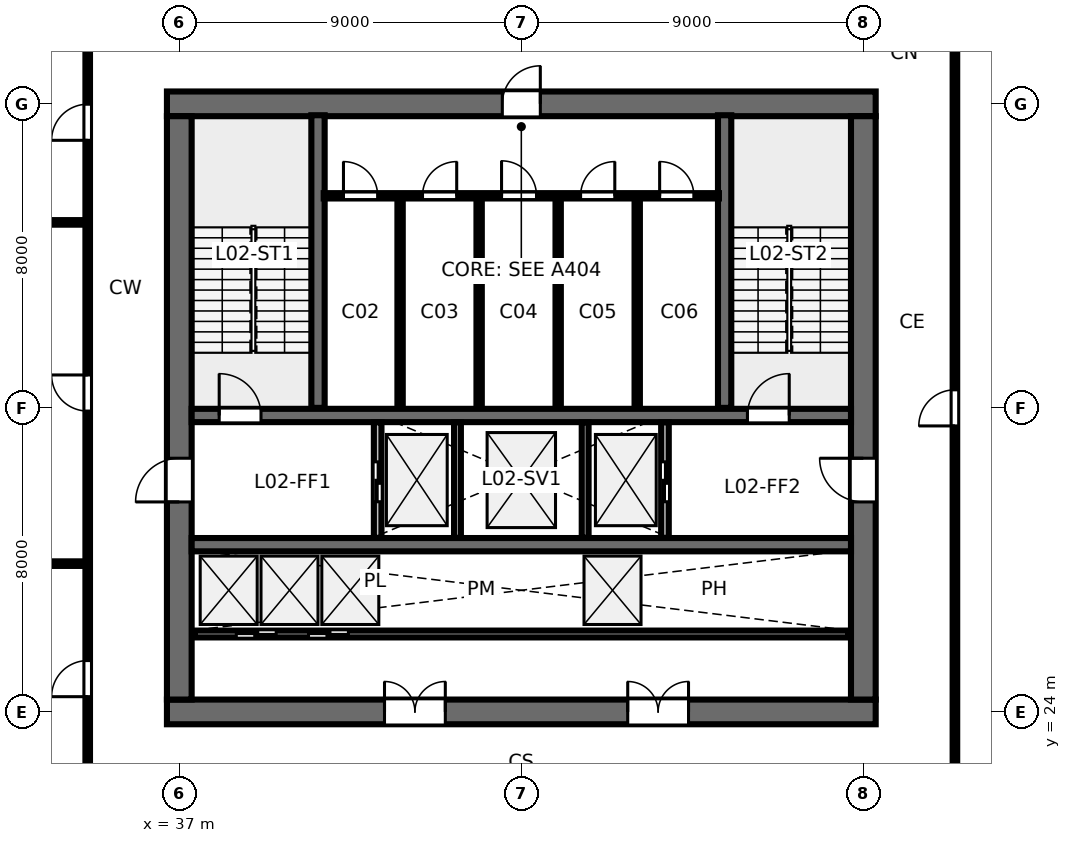
"""IFC4 building model, lengths in metres.
Left out: names, types, materials, properties, quantities, classifications, styles, units other than length and angle.
Written with IfcOpenShell. Run it as: python <this file> out.ifc"""

import sys

from ifc_helpers import new_model, si_unit, direction, frame, frame_2d, origin, place, context, subcontext, project, spatial, rectangle, extrude, element, fill, save


model = new_model("IFC4")
c1 = context("Model", 3, precision=1e-05, world=origin(), true_north=direction((0.0, 1.0)))
c2 = subcontext(c1, "Body", "Model", "MODEL_VIEW")
j1 = project(units=[si_unit("LENGTHUNIT", "METRE"), si_unit("PLANEANGLEUNIT", "RADIAN")], contexts=[c1])
p1 = place(None, origin())
s1 = spatial("IfcSite", under=j1, at=p1, CompositionType="ELEMENT")
p2 = place(p1, origin())
s2 = spatial("IfcBuilding", under=s1, at=p2, CompositionType="ELEMENT")
p3 = place(p2, frame((0.0, 0.0, 9.5)))
s3 = spatial("IfcBuildingStorey", under=s2, at=p3, CompositionType="ELEMENT", Elevation=9.5)
p4 = place(p3, frame((36.675, 24.0, 0.0), z_axis=(0.0, 0.0, 1.0), x_axis=(1.0, 0.0, 0.0)))
e1 = element("IfcWall", 1, at=p4, inside=s3, PredefinedType="SHEAR", context=c2, shape_type="SweptSolid", body=[
    extrude(rectangle(XDim=18.65, YDim=0.65, at=frame_2d((9.325, 0.0))), origin(), (0.0, 0.0, 1.0), 4.22),
])
p5 = place(p4, frame((5.725, 0.0, 0.0)))
e2 = element("IfcOpeningElement", 2, at=p5, cuts=e1, PredefinedType="OPENING", context=c2, shape_type="SweptSolid", body=[
    extrude(rectangle(XDim=1.6, YDim=2.15, at=frame_2d((0.8, 1.075))), frame((0.0, 0.335, 0.0), z_axis=(0.0, -1.0, 0.0), x_axis=(1.0, 0.0, 0.0)), (0.0, 0.0, 1.0), 0.67),
])
p6 = place(p4, frame((12.125, 0.0, 0.0)))
e3 = element("IfcOpeningElement", 3, at=p6, cuts=e1, PredefinedType="OPENING", context=c2, shape_type="SweptSolid", body=[
    extrude(rectangle(XDim=1.6, YDim=2.15, at=frame_2d((0.8, 1.075))), frame((0.0, 0.335, 0.0), z_axis=(0.0, -1.0, 0.0), x_axis=(1.0, 0.0, 0.0)), (0.0, 0.0, 1.0), 0.67),
])
p7 = place(p3, frame((36.675, 40.0, 0.0), z_axis=(0.0, 0.0, 1.0), x_axis=(1.0, 0.0, 0.0)))
e4 = element("IfcWall", 4, at=p7, inside=s3, PredefinedType="SHEAR", context=c2, shape_type="SweptSolid", body=[
    extrude(rectangle(XDim=18.65, YDim=0.65, at=frame_2d((9.325, 0.0))), origin(), (0.0, 0.0, 1.0), 4.22),
])
p8 = place(p7, frame((8.825, 0.0, 0.0)))
e5 = element("IfcOpeningElement", 5, at=p8, cuts=e4, PredefinedType="OPENING", context=c2, shape_type="SweptSolid", body=[
    extrude(rectangle(XDim=1.0, YDim=2.15, at=frame_2d((0.5, 1.075))), frame((0.0, 0.335, 0.0), z_axis=(0.0, -1.0, 0.0), x_axis=(1.0, 0.0, 0.0)), (0.0, 0.0, 1.0), 0.67),
])
p9 = place(p3, frame((37.0, 24.325, 0.0), z_axis=(0.0, 0.0, 1.0), x_axis=(0.0, 1.0, 0.0)))
e6 = element("IfcWall", 6, at=p9, inside=s3, PredefinedType="SHEAR", context=c2, shape_type="SweptSolid", body=[
    extrude(rectangle(XDim=15.35, YDim=0.65, at=frame_2d((7.675, 0.0))), origin(), (0.0, 0.0, 1.0), 4.22),
])
p10 = place(p9, frame((5.2, 0.0, 0.0)))
e7 = element("IfcOpeningElement", 7, at=p10, cuts=e6, PredefinedType="OPENING", context=c2, shape_type="SweptSolid", body=[
    extrude(rectangle(XDim=1.15, YDim=2.15, at=frame_2d((0.575, 1.075))), frame((0.0, 0.335, 0.0), z_axis=(0.0, -1.0, 0.0), x_axis=(1.0, 0.0, 0.0)), (0.0, 0.0, 1.0), 0.67),
])
p11 = place(p3, frame((55.0, 24.325, 0.0), z_axis=(0.0, 0.0, 1.0), x_axis=(0.0, 1.0, 0.0)))
e8 = element("IfcWall", 8, at=p11, inside=s3, PredefinedType="SHEAR", context=c2, shape_type="SweptSolid", body=[
    extrude(rectangle(XDim=15.35, YDim=0.65, at=frame_2d((7.675, 0.0))), origin(), (0.0, 0.0, 1.0), 4.22),
])
p12 = place(p11, frame((5.2, 0.0, 0.0)))
e9 = element("IfcOpeningElement", 9, at=p12, cuts=e8, PredefinedType="OPENING", context=c2, shape_type="SweptSolid", body=[
    extrude(rectangle(XDim=1.15, YDim=2.15, at=frame_2d((0.575, 1.075))), frame((0.0, 0.335, 0.0), z_axis=(0.0, -1.0, 0.0), x_axis=(1.0, 0.0, 0.0)), (0.0, 0.0, 1.0), 0.67),
])
p13 = place(p3, frame((37.325, 31.8, 0.0), z_axis=(0.0, 0.0, 1.0), x_axis=(1.0, 0.0, 0.0)))
e10 = element("IfcWall", 10, at=p13, inside=s3, PredefinedType="SHEAR", context=c2, shape_type="SweptSolid", body=[
    extrude(rectangle(XDim=17.35, YDim=0.35, at=frame_2d((8.675, 0.0))), origin(), (0.0, 0.0, 1.0), 4.22),
])
p14 = place(p13, frame((0.725, 0.0, 0.0)))
e11 = element("IfcOpeningElement", 11, at=p14, cuts=e10, PredefinedType="OPENING", context=c2, shape_type="SweptSolid", body=[
    extrude(rectangle(XDim=1.1, YDim=2.15, at=frame_2d((0.55, 1.075))), frame((0.0, 0.185, 0.0), z_axis=(0.0, -1.0, 0.0), x_axis=(1.0, 0.0, 0.0)), (0.0, 0.0, 1.0), 0.37),
])
p15 = place(p13, frame((14.625, 0.0, 0.0)))
e12 = element("IfcOpeningElement", 12, at=p15, cuts=e10, PredefinedType="OPENING", context=c2, shape_type="SweptSolid", body=[
    extrude(rectangle(XDim=1.1, YDim=2.15, at=frame_2d((0.55, 1.075))), frame((0.0, 0.185, 0.0), z_axis=(0.0, -1.0, 0.0), x_axis=(1.0, 0.0, 0.0)), (0.0, 0.0, 1.0), 0.37),
])
p16 = place(p3, frame((37.325, 28.4, 0.0), z_axis=(0.0, 0.0, 1.0), x_axis=(1.0, 0.0, 0.0)))
e13 = element("IfcWall", 13, at=p16, inside=s3, PredefinedType="SHEAR", context=c2, shape_type="SweptSolid", body=[
    extrude(rectangle(XDim=17.35, YDim=0.35, at=frame_2d((8.675, 0.0))), origin(), (0.0, 0.0, 1.0), 4.22),
])
for number, where, z_axis, x_axis in (
    (14, (40.65, 32.0, 0.0), (0.0, 0.0, 1.0), (0.0, 1.0, 0.0)),
    (15, (51.35, 32.0, 0.0), (0.0, 0.0, 1.0), (0.0, 1.0, 0.0)),
):
    element("IfcWall", number, at=place(p3, frame(where, z_axis=z_axis, x_axis=x_axis)), inside=s3, PredefinedType="SHEAR", context=c2, shape_type="SweptSolid", body=[
        extrude(rectangle(XDim=7.7, YDim=0.35, at=frame_2d((3.85, 0.0))), origin(), (0.0, 0.0, 1.0), 4.5),
    ])
for number, where, z_axis, x_axis in (
    (16, (42.81, 32.05, 0.0), (0.0, 0.0, 1.0), (0.0, 1.0, 0.0)),
    (17, (44.89, 32.05, 0.0), (0.0, 0.0, 1.0), (0.0, 1.0, 0.0)),
    (18, (46.97, 32.05, 0.0), (0.0, 0.0, 1.0), (0.0, 1.0, 0.0)),
    (19, (49.05, 32.05, 0.0), (0.0, 0.0, 1.0), (0.0, 1.0, 0.0)),
):
    element("IfcWall", number, at=place(p3, frame(where, z_axis=z_axis, x_axis=x_axis)), inside=s3, PredefinedType="PARTITIONING", context=c2, shape_type="SweptSolid", body=[
        extrude(rectangle(XDim=5.5, YDim=0.14, at=frame_2d((2.75, 0.0))), origin(), (0.0, 0.0, 1.0), 4.21),
    ])
p17 = place(p3, frame((40.8, 37.58, 0.0), z_axis=(0.0, 0.0, 1.0), x_axis=(1.0, 0.0, 0.0)))
e20 = element("IfcWall", 20, at=p17, inside=s3, PredefinedType="PARTITIONING", context=c2, shape_type="SweptSolid", body=[
    extrude(rectangle(XDim=10.4, YDim=0.14, at=frame_2d((5.2, 0.0))), origin(), (0.0, 0.0, 1.0), 4.21),
])
p18 = place(p17, frame((0.52, 0.0, 0.0)))
e21 = element("IfcOpeningElement", 21, at=p18, cuts=e20, PredefinedType="OPENING", context=c2, shape_type="SweptSolid", body=[
    extrude(rectangle(XDim=0.9, YDim=2.15, at=frame_2d((0.45, 1.075))), frame((0.0, 0.08, 0.0), z_axis=(0.0, -1.0, 0.0), x_axis=(1.0, 0.0, 0.0)), (0.0, 0.0, 1.0), 0.16),
])
p19 = place(p17, frame((2.6, 0.0, 0.0)))
e22 = element("IfcOpeningElement", 22, at=p19, cuts=e20, PredefinedType="OPENING", context=c2, shape_type="SweptSolid", body=[
    extrude(rectangle(XDim=0.9, YDim=2.15, at=frame_2d((0.45, 1.075))), frame((0.0, 0.08, 0.0), z_axis=(0.0, -1.0, 0.0), x_axis=(1.0, 0.0, 0.0)), (0.0, 0.0, 1.0), 0.16),
])
p20 = place(p17, frame((4.68, 0.0, 0.0)))
e23 = element("IfcOpeningElement", 23, at=p20, cuts=e20, PredefinedType="OPENING", context=c2, shape_type="SweptSolid", body=[
    extrude(rectangle(XDim=0.92, YDim=2.15, at=frame_2d((0.46, 1.075))), frame((0.0, 0.08, 0.0), z_axis=(0.0, -1.0, 0.0), x_axis=(1.0, 0.0, 0.0)), (0.0, 0.0, 1.0), 0.16),
])
p21 = place(p17, frame((6.76, 0.0, 0.0)))
e24 = element("IfcOpeningElement", 24, at=p21, cuts=e20, PredefinedType="OPENING", context=c2, shape_type="SweptSolid", body=[
    extrude(rectangle(XDim=0.9, YDim=2.15, at=frame_2d((0.45, 1.075))), frame((0.0, 0.08, 0.0), z_axis=(0.0, -1.0, 0.0), x_axis=(1.0, 0.0, 0.0)), (0.0, 0.0, 1.0), 0.16),
])
p22 = place(p17, frame((8.84, 0.0, 0.0)))
e25 = element("IfcOpeningElement", 25, at=p22, cuts=e20, PredefinedType="OPENING", context=c2, shape_type="SweptSolid", body=[
    extrude(rectangle(XDim=0.9, YDim=2.15, at=frame_2d((0.45, 1.075))), frame((0.0, 0.08, 0.0), z_axis=(0.0, -1.0, 0.0), x_axis=(1.0, 0.0, 0.0)), (0.0, 0.0, 1.0), 0.16),
])
p23 = place(p3, frame((42.22, 28.58, 0.0), z_axis=(0.0, 0.0, 1.0), x_axis=(0.0, 1.0, 0.0)))
e26 = element("IfcWall", 26, at=p23, inside=s3, PredefinedType="PARTITIONING", context=c2, shape_type="SweptSolid", body=[
    extrude(rectangle(XDim=3.04, YDim=0.2, at=frame_2d((1.52, 0.0))), origin(), (0.0, 0.0, 1.0), 4.21),
])
p24 = place(p23, frame((0.95, 0.0, 0.0)))
e27 = element("IfcOpeningElement", 27, at=p24, cuts=e26, PredefinedType="OPENING", context=c2, shape_type="SweptSolid", body=[
    extrude(rectangle(XDim=1.05, YDim=2.15, at=frame_2d((0.525, 1.075))), frame((0.0, 0.11, 0.0), z_axis=(0.0, -1.0, 0.0), x_axis=(1.0, 0.0, 0.0)), (0.0, 0.0, 1.0), 0.22),
])
p25 = place(p3, frame((49.78, 28.58, 0.0), z_axis=(0.0, 0.0, 1.0), x_axis=(0.0, 1.0, 0.0)))
e28 = element("IfcWall", 28, at=p25, inside=s3, PredefinedType="PARTITIONING", context=c2, shape_type="SweptSolid", body=[
    extrude(rectangle(XDim=3.04, YDim=0.2, at=frame_2d((1.52, 0.0))), origin(), (0.0, 0.0, 1.0), 4.21),
])
p26 = place(p25, frame((0.95, 0.0, 0.0)))
e29 = element("IfcOpeningElement", 29, at=p26, cuts=e28, PredefinedType="OPENING", context=c2, shape_type="SweptSolid", body=[
    extrude(rectangle(XDim=1.05, YDim=2.15, at=frame_2d((0.525, 1.075))), frame((0.0, 0.11, 0.0), z_axis=(0.0, -1.0, 0.0), x_axis=(1.0, 0.0, 0.0)), (0.0, 0.0, 1.0), 0.22),
])
for number, where, z_axis, x_axis in (
    (30, (44.32, 28.58, 0.0), (0.0, 0.0, 1.0), (0.0, 1.0, 0.0)),
    (31, (47.68, 28.58, 0.0), (0.0, 0.0, 1.0), (0.0, 1.0, 0.0)),
):
    element("IfcWall", number, at=place(p3, frame(where, z_axis=z_axis, x_axis=x_axis)), inside=s3, PredefinedType="PARTITIONING", context=c2, shape_type="SweptSolid", body=[
        extrude(rectangle(XDim=3.04, YDim=0.18, at=frame_2d((1.52, 0.0))), origin(), (0.0, 0.0, 1.0), 4.21),
    ])
p27 = place(p3, frame((37.4, 26.05, 0.0), z_axis=(0.0, 0.0, 1.0), x_axis=(1.0, 0.0, 0.0)))
e32 = element("IfcWall", 32, at=p27, inside=s3, PredefinedType="PARTITIONING", context=c2, shape_type="SweptSolid", body=[
    extrude(rectangle(XDim=17.2, YDim=0.18, at=frame_2d((8.6, 0.0))), origin(), (0.0, 0.0, 1.0), 4.21),
])
p28 = place(p27, frame((1.1, 0.0, 0.0)))
e33 = element("IfcOpeningElement", 33, at=p28, cuts=e32, PredefinedType="OPENING", context=c2, shape_type="SweptSolid", body=[
    extrude(rectangle(XDim=1.05, YDim=2.15, at=frame_2d((0.525, 1.075))), frame((0.0, 0.1, 0.0), z_axis=(0.0, -1.0, 0.0), x_axis=(1.0, 0.0, 0.0)), (0.0, 0.0, 1.0), 0.2),
])
p29 = place(p27, frame((3.0, 0.0, 0.0)))
e34 = element("IfcOpeningElement", 34, at=p29, cuts=e32, PredefinedType="OPENING", context=c2, shape_type="SweptSolid", body=[
    extrude(rectangle(XDim=1.05, YDim=2.15, at=frame_2d((0.525, 1.075))), frame((0.0, 0.1, 0.0), z_axis=(0.0, -1.0, 0.0), x_axis=(1.0, 0.0, 0.0)), (0.0, 0.0, 1.0), 0.2),
])
p30 = place(p3, frame((34.59, 27.902, 0.0), z_axis=(0.0, 0.0, 1.0), x_axis=(-1.0, 0.0, 0.0)))
e35 = element("IfcWall", 35, at=p30, inside=s3, PredefinedType="PARTITIONING", context=c2, shape_type="SweptSolid", body=[
    extrude(rectangle(XDim=6.24, YDim=0.12, at=frame_2d((3.12, 0.0))), origin(), (0.0, 0.0, 1.0), 3.31),
])
p31 = place(p30, frame((1.4, 0.0, 0.0)))
e36 = element("IfcOpeningElement", 36, at=p31, cuts=e35, PredefinedType="OPENING", context=c2, shape_type="SweptSolid", body=[
    extrude(rectangle(XDim=0.9, YDim=2.15, at=frame_2d((0.45, 1.075))), frame((0.0, 0.07, 0.0), z_axis=(0.0, -1.0, 0.0), x_axis=(1.0, 0.0, 0.0)), (0.0, 0.0, 1.0), 0.14),
])
p32 = place(p3, frame((34.59, 36.88, 0.0), z_axis=(0.0, 0.0, 1.0), x_axis=(-1.0, 0.0, 0.0)))
e37 = element("IfcWall", 37, at=p32, inside=s3, PredefinedType="PARTITIONING", context=c2, shape_type="SweptSolid", body=[
    extrude(rectangle(XDim=25.41, YDim=0.12, at=frame_2d((12.705, 0.0))), origin(), (0.0, 0.0, 1.0), 3.31),
])
p33 = place(p32, frame((1.4, 0.0, 0.0)))
e38 = element("IfcOpeningElement", 38, at=p33, cuts=e37, PredefinedType="OPENING", context=c2, shape_type="SweptSolid", body=[
    extrude(rectangle(XDim=0.9, YDim=2.15, at=frame_2d((0.45, 1.075))), frame((0.0, 0.07, 0.0), z_axis=(0.0, -1.0, 0.0), x_axis=(1.0, 0.0, 0.0)), (0.0, 0.0, 1.0), 0.14),
])
p34 = place(p3, frame((34.59, 21.65, 0.0), z_axis=(0.0, 0.0, 1.0), x_axis=(0.0, 1.0, 0.0)))
e39 = element("IfcWall", 39, at=p34, inside=s3, PredefinedType="PARTITIONING", context=c2, shape_type="SweptSolid", body=[
    extrude(rectangle(XDim=20.7, YDim=0.12, at=frame_2d((10.35, 0.0))), origin(), (0.0, 0.0, 1.0), 3.31),
])
p35 = place(p34, frame((2.751, 0.0, 0.0)))
e40 = element("IfcOpeningElement", 40, at=p35, cuts=e39, PredefinedType="OPENING", context=c2, shape_type="SweptSolid", body=[
    extrude(rectangle(XDim=0.95, YDim=2.15, at=frame_2d((0.475, 1.075))), frame((0.0, 0.07, 0.0), z_axis=(0.0, -1.0, 0.0), x_axis=(1.0, 0.0, 0.0)), (0.0, 0.0, 1.0), 0.14),
])
p36 = place(p34, frame((10.266, 0.0, 0.0)))
e41 = element("IfcOpeningElement", 41, at=p36, cuts=e39, PredefinedType="OPENING", context=c2, shape_type="SweptSolid", body=[
    extrude(rectangle(XDim=0.95, YDim=2.15, at=frame_2d((0.475, 1.075))), frame((0.0, 0.07, 0.0), z_axis=(0.0, -1.0, 0.0), x_axis=(1.0, 0.0, 0.0)), (0.0, 0.0, 1.0), 0.14),
])
p37 = place(p34, frame((17.39, 0.0, 0.0)))
e42 = element("IfcOpeningElement", 42, at=p37, cuts=e39, PredefinedType="OPENING", context=c2, shape_type="SweptSolid", body=[
    extrude(rectangle(XDim=0.95, YDim=2.15, at=frame_2d((0.475, 1.075))), frame((0.0, 0.07, 0.0), z_axis=(0.0, -1.0, 0.0), x_axis=(1.0, 0.0, 0.0)), (0.0, 0.0, 1.0), 0.14),
])
p38 = place(p3, frame((57.41, 21.65, 0.0), z_axis=(0.0, 0.0, 1.0), x_axis=(0.0, 1.0, 0.0)))
e43 = element("IfcWall", 43, at=p38, inside=s3, PredefinedType="PARTITIONING", context=c2, shape_type="SweptSolid", body=[
    extrude(rectangle(XDim=20.7, YDim=0.12, at=frame_2d((10.35, 0.0))), origin(), (0.0, 0.0, 1.0), 3.31),
])
p39 = place(p38, frame((9.875, 0.0, 0.0)))
e44 = element("IfcOpeningElement", 44, at=p39, cuts=e43, PredefinedType="OPENING", context=c2, shape_type="SweptSolid", body=[
    extrude(rectangle(XDim=0.95, YDim=2.15, at=frame_2d((0.475, 1.075))), frame((0.0, 0.07, 0.0), z_axis=(0.0, -1.0, 0.0), x_axis=(1.0, 0.0, 0.0)), (0.0, 0.0, 1.0), 0.14),
])
p40 = place(p14, origin())
e45 = element("IfcDoor", 45, at=p40, inside=s3, OperationType="SINGLE_SWING_LEFT", PredefinedType="DOOR", context=c2, shape_type="SweptSolid", body=[
    extrude(rectangle(XDim=1.1, YDim=2.15, at=frame_2d((0.55, 1.075))), frame((0.0, 0.025, 0.0), z_axis=(0.0, -1.0, 0.0), x_axis=(1.0, 0.0, 0.0)), (0.0, 0.0, 1.0), 0.05),
])
fill(e11, e45)
p41 = place(p15, origin())
e46 = element("IfcDoor", 46, at=p41, inside=s3, OperationType="SINGLE_SWING_RIGHT", PredefinedType="DOOR", context=c2, shape_type="SweptSolid", body=[
    extrude(rectangle(XDim=1.1, YDim=2.15, at=frame_2d((0.55, 1.075))), frame((0.0, 0.025, 0.0), z_axis=(0.0, -1.0, 0.0), x_axis=(1.0, 0.0, 0.0)), (0.0, 0.0, 1.0), 0.05),
])
fill(e12, e46)
p42 = place(p8, origin())
e47 = element("IfcDoor", 47, at=p42, inside=s3, OperationType="SINGLE_SWING_RIGHT", PredefinedType="DOOR", context=c2, shape_type="SweptSolid", body=[
    extrude(rectangle(XDim=1.0, YDim=2.15, at=frame_2d((0.5, 1.075))), frame((0.0, 0.025, 0.0), z_axis=(0.0, -1.0, 0.0), x_axis=(1.0, 0.0, 0.0)), (0.0, 0.0, 1.0), 0.05),
])
fill(e5, e47)
p43 = place(p10, origin())
e48 = element("IfcDoor", 48, at=p43, inside=s3, OperationType="SINGLE_SWING_LEFT", PredefinedType="DOOR", context=c2, shape_type="SweptSolid", body=[
    extrude(rectangle(XDim=1.15, YDim=2.15, at=frame_2d((0.575, 1.075))), frame((0.0, 0.025, 0.0), z_axis=(0.0, -1.0, 0.0), x_axis=(1.0, 0.0, 0.0)), (0.0, 0.0, 1.0), 0.05),
])
fill(e7, e48)
p44 = place(p12, origin())
e49 = element("IfcDoor", 49, at=p44, inside=s3, OperationType="SINGLE_SWING_RIGHT", PredefinedType="DOOR", context=c2, shape_type="SweptSolid", body=[
    extrude(rectangle(XDim=1.15, YDim=2.15, at=frame_2d((0.575, 1.075))), frame((0.0, 0.025, 0.0), z_axis=(0.0, -1.0, 0.0), x_axis=(1.0, 0.0, 0.0)), (0.0, 0.0, 1.0), 0.05),
])
fill(e9, e49)
p45 = place(p5, origin())
e50 = element("IfcDoor", 50, at=p45, inside=s3, OperationType="DOUBLE_DOOR_SINGLE_SWING", PredefinedType="DOOR", context=c2, shape_type="SweptSolid", body=[
    extrude(rectangle(XDim=1.6, YDim=2.15, at=frame_2d((0.8, 1.075))), frame((0.0, 0.025, 0.0), z_axis=(0.0, -1.0, 0.0), x_axis=(1.0, 0.0, 0.0)), (0.0, 0.0, 1.0), 0.05),
])
fill(e2, e50)
p46 = place(p6, origin())
e51 = element("IfcDoor", 51, at=p46, inside=s3, OperationType="DOUBLE_DOOR_SINGLE_SWING", PredefinedType="DOOR", context=c2, shape_type="SweptSolid", body=[
    extrude(rectangle(XDim=1.6, YDim=2.15, at=frame_2d((0.8, 1.075))), frame((0.0, 0.025, 0.0), z_axis=(0.0, -1.0, 0.0), x_axis=(1.0, 0.0, 0.0)), (0.0, 0.0, 1.0), 0.05),
])
fill(e3, e51)
p47 = place(p18, origin())
e52 = element("IfcDoor", 52, at=p47, inside=s3, OperationType="SINGLE_SWING_LEFT", PredefinedType="DOOR", context=c2, shape_type="SweptSolid", body=[
    extrude(rectangle(XDim=0.9, YDim=2.15, at=frame_2d((0.45, 1.075))), frame((0.0, 0.025, 0.0), z_axis=(0.0, -1.0, 0.0), x_axis=(1.0, 0.0, 0.0)), (0.0, 0.0, 1.0), 0.05),
])
fill(e21, e52)
p48 = place(p19, origin())
e53 = element("IfcDoor", 53, at=p48, inside=s3, OperationType="SINGLE_SWING_RIGHT", PredefinedType="DOOR", context=c2, shape_type="SweptSolid", body=[
    extrude(rectangle(XDim=0.9, YDim=2.15, at=frame_2d((0.45, 1.075))), frame((0.0, 0.025, 0.0), z_axis=(0.0, -1.0, 0.0), x_axis=(1.0, 0.0, 0.0)), (0.0, 0.0, 1.0), 0.05),
])
fill(e22, e53)
p49 = place(p20, origin())
e54 = element("IfcDoor", 54, at=p49, inside=s3, OperationType="SINGLE_SWING_LEFT", PredefinedType="DOOR", context=c2, shape_type="SweptSolid", body=[
    extrude(rectangle(XDim=0.92, YDim=2.15, at=frame_2d((0.46, 1.075))), frame((0.0, 0.025, 0.0), z_axis=(0.0, -1.0, 0.0), x_axis=(1.0, 0.0, 0.0)), (0.0, 0.0, 1.0), 0.05),
])
fill(e23, e54)
p50 = place(p21, origin())
e55 = element("IfcDoor", 55, at=p50, inside=s3, OperationType="SINGLE_SWING_RIGHT", PredefinedType="DOOR", context=c2, shape_type="SweptSolid", body=[
    extrude(rectangle(XDim=0.9, YDim=2.15, at=frame_2d((0.45, 1.075))), frame((0.0, 0.025, 0.0), z_axis=(0.0, -1.0, 0.0), x_axis=(1.0, 0.0, 0.0)), (0.0, 0.0, 1.0), 0.05),
])
fill(e24, e55)
p51 = place(p22, origin())
e56 = element("IfcDoor", 56, at=p51, inside=s3, OperationType="SINGLE_SWING_LEFT", PredefinedType="DOOR", context=c2, shape_type="SweptSolid", body=[
    extrude(rectangle(XDim=0.9, YDim=2.15, at=frame_2d((0.45, 1.075))), frame((0.0, 0.025, 0.0), z_axis=(0.0, -1.0, 0.0), x_axis=(1.0, 0.0, 0.0)), (0.0, 0.0, 1.0), 0.05),
])
fill(e25, e56)
p52 = place(p24, origin())
e57 = element("IfcDoor", 57, at=p52, inside=s3, OperationType="SLIDING_TO_LEFT", PredefinedType="DOOR", context=c2, shape_type="SweptSolid", body=[
    extrude(rectangle(XDim=1.05, YDim=2.15, at=frame_2d((0.525, 1.075))), frame((0.0, 0.025, 0.0), z_axis=(0.0, -1.0, 0.0), x_axis=(1.0, 0.0, 0.0)), (0.0, 0.0, 1.0), 0.05),
])
fill(e27, e57)
p53 = place(p26, origin())
e58 = element("IfcDoor", 58, at=p53, inside=s3, OperationType="SLIDING_TO_RIGHT", PredefinedType="DOOR", context=c2, shape_type="SweptSolid", body=[
    extrude(rectangle(XDim=1.05, YDim=2.15, at=frame_2d((0.525, 1.075))), frame((0.0, 0.025, 0.0), z_axis=(0.0, -1.0, 0.0), x_axis=(1.0, 0.0, 0.0)), (0.0, 0.0, 1.0), 0.05),
])
fill(e29, e58)
p54 = place(p28, origin())
e59 = element("IfcDoor", 59, at=p54, inside=s3, OperationType="SLIDING_TO_LEFT", PredefinedType="DOOR", context=c2, shape_type="SweptSolid", body=[
    extrude(rectangle(XDim=1.05, YDim=2.15, at=frame_2d((0.525, 1.075))), frame((0.0, 0.025, 0.0), z_axis=(0.0, -1.0, 0.0), x_axis=(1.0, 0.0, 0.0)), (0.0, 0.0, 1.0), 0.05),
])
fill(e33, e59)
p55 = place(p29, origin())
e60 = element("IfcDoor", 60, at=p55, inside=s3, OperationType="SLIDING_TO_RIGHT", PredefinedType="DOOR", context=c2, shape_type="SweptSolid", body=[
    extrude(rectangle(XDim=1.05, YDim=2.15, at=frame_2d((0.525, 1.075))), frame((0.0, 0.025, 0.0), z_axis=(0.0, -1.0, 0.0), x_axis=(1.0, 0.0, 0.0)), (0.0, 0.0, 1.0), 0.05),
])
fill(e34, e60)
p56 = place(p35, origin())
e61 = element("IfcDoor", 61, at=p56, inside=s3, OperationType="SINGLE_SWING_LEFT", PredefinedType="DOOR", context=c2, shape_type="SweptSolid", body=[
    extrude(rectangle(XDim=0.95, YDim=2.15, at=frame_2d((0.475, 1.075))), frame((0.0, 0.025, 0.0), z_axis=(0.0, -1.0, 0.0), x_axis=(1.0, 0.0, 0.0)), (0.0, 0.0, 1.0), 0.05),
])
fill(e40, e61)
p57 = place(p36, origin())
e62 = element("IfcDoor", 62, at=p57, inside=s3, OperationType="SINGLE_SWING_RIGHT", PredefinedType="DOOR", context=c2, shape_type="SweptSolid", body=[
    extrude(rectangle(XDim=0.95, YDim=2.15, at=frame_2d((0.475, 1.075))), frame((0.0, 0.025, 0.0), z_axis=(0.0, -1.0, 0.0), x_axis=(1.0, 0.0, 0.0)), (0.0, 0.0, 1.0), 0.05),
])
fill(e41, e62)
p58 = place(p37, origin())
e63 = element("IfcDoor", 63, at=p58, inside=s3, OperationType="SINGLE_SWING_LEFT", PredefinedType="DOOR", context=c2, shape_type="SweptSolid", body=[
    extrude(rectangle(XDim=0.95, YDim=2.15, at=frame_2d((0.475, 1.075))), frame((0.0, 0.025, 0.0), z_axis=(0.0, -1.0, 0.0), x_axis=(1.0, 0.0, 0.0)), (0.0, 0.0, 1.0), 0.05),
])
fill(e42, e63)
p59 = place(p39, origin())
e64 = element("IfcDoor", 64, at=p59, inside=s3, OperationType="SINGLE_SWING_LEFT", PredefinedType="DOOR", context=c2, shape_type="SweptSolid", body=[
    extrude(rectangle(XDim=0.95, YDim=2.15, at=frame_2d((0.475, 1.075))), frame((0.0, 0.025, 0.0), z_axis=(0.0, -1.0, 0.0), x_axis=(1.0, 0.0, 0.0)), (0.0, 0.0, 1.0), 0.05),
])
fill(e44, e64)
save(model, sys.argv[1])
